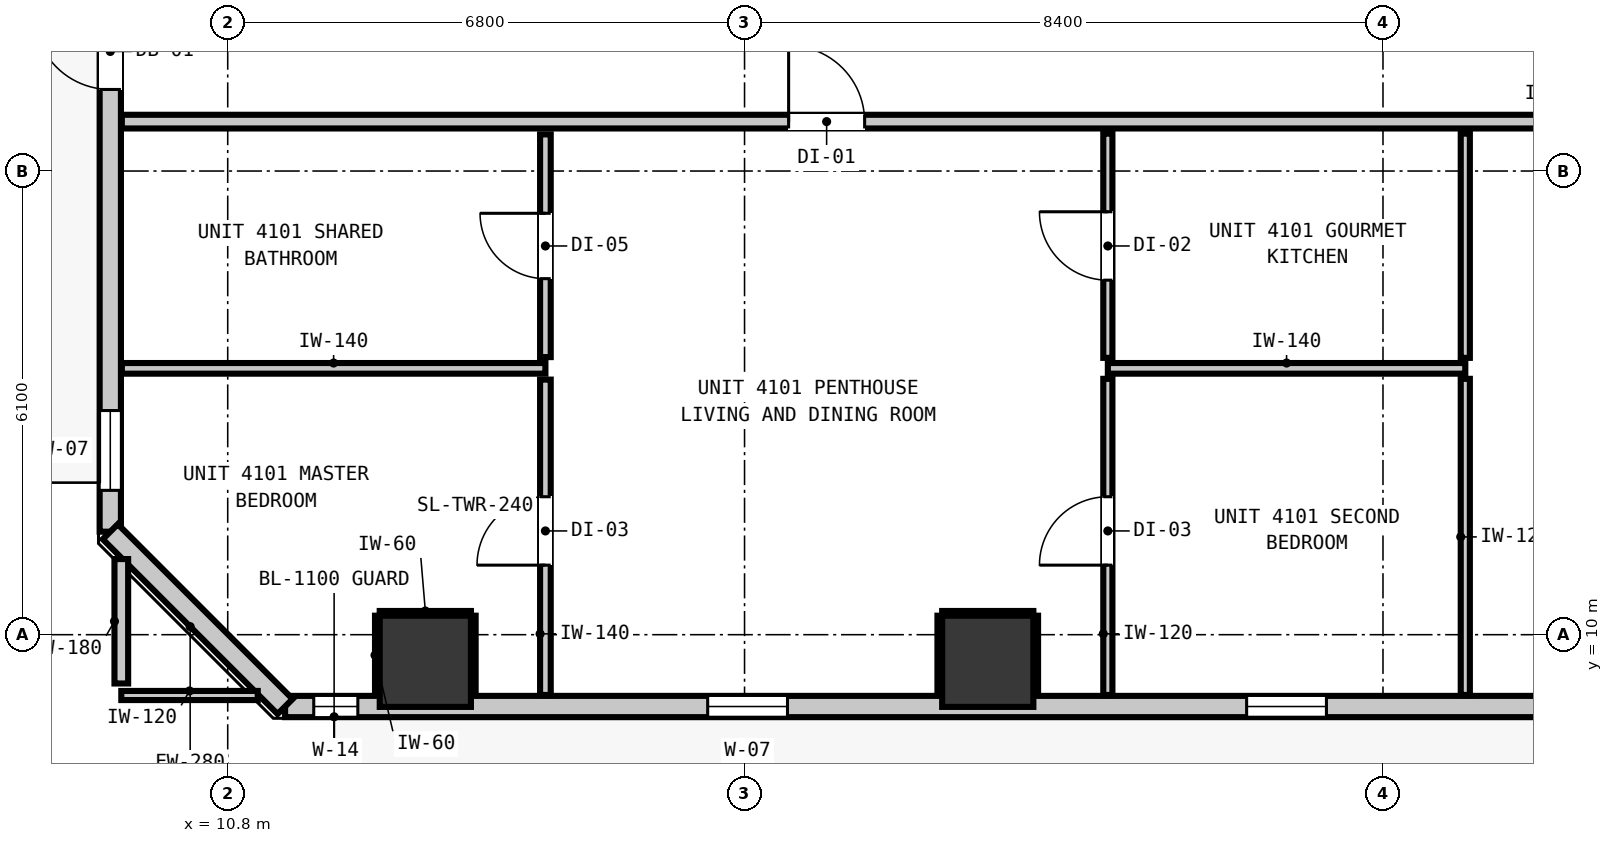
"""IFC4 building model, lengths in metres.
Left out: names, types, materials, properties, quantities, classifications, styles, units other than length and angle.
Written with IfcOpenShell. Run it as: python <this file> out.ifc"""

import sys

from ifc_helpers import new_model, si_unit, direction, frame, frame_2d, origin, origin_2d, place, context, subcontext, project, spatial, rectangle, extrude, element, fill, save


model = new_model("IFC4")
c1 = context("Model", 3, precision=1e-05, world=origin(), true_north=direction((0.0, 1.0)))
c2 = subcontext(c1, "Body", "Model", "MODEL_VIEW")
j1 = project(units=[si_unit("LENGTHUNIT", "METRE"), si_unit("PLANEANGLEUNIT", "RADIAN")], contexts=[c1])
p1 = place(None, origin())
s1 = spatial("IfcSite", under=j1, at=p1, CompositionType="ELEMENT")
p2 = place(p1, origin())
s2 = spatial("IfcBuilding", under=s1, at=p2, CompositionType="ELEMENT")
p3 = place(p2, frame((0.0, 0.0, 142.6)))
s3 = spatial("IfcBuildingStorey", under=s2, at=p3, CompositionType="ELEMENT", Elevation=142.6)
for number, where, z_axis, x_axis in (
    (1, (13.4, 9.65, 0.0), (0.0, 0.0, 1.0), (1.0, 0.0, 0.0)),
    (2, (20.8, 9.65, 0.0), (0.0, 0.0, 1.0), (1.0, 0.0, 0.0)),
):
    element("IfcColumn", number, at=place(p3, frame(where, z_axis=z_axis, x_axis=x_axis)), inside=s3, PredefinedType="COLUMN", context=c2, shape_type="SweptSolid", body=[
        extrude(rectangle(XDim=1.2, YDim=1.2, at=origin_2d()), origin(), (0.0, 0.0, 1.0), 2.9),
    ])
p4 = place(p3, frame((9.255, 11.355, 0.0), z_axis=(0.0, 0.0, 1.0), x_axis=(0.0, 1.0, 0.0)))
e3 = element("IfcWall", 3, at=p4, inside=s3, PredefinedType="STANDARD", context=c2, shape_type="SweptSolid", body=[
    extrude(rectangle(XDim=32.29, YDim=0.28, at=frame_2d((16.145, 0.0))), origin(), (0.0, 0.0, 1.0), 2.9),
])
p5 = place(p4, frame((5.818, 0.0, 0.0)))
e4 = element("IfcOpeningElement", 4, at=p5, cuts=e3, PredefinedType="OPENING", context=c2, shape_type="SweptSolid", body=[
    extrude(rectangle(XDim=1.0, YDim=2.15, at=frame_2d((0.5, 1.075))), frame((0.0, 0.15, 0.0), z_axis=(0.0, -1.0, 0.0), x_axis=(1.0, 0.0, 0.0)), (0.0, 0.0, 1.0), 0.3),
])
p6 = place(p4, frame((0.544, 0.0, 0.85)))
e5 = element("IfcOpeningElement", 5, at=p6, cuts=e3, PredefinedType="OPENING", context=c2, shape_type="SweptSolid", body=[
    extrude(rectangle(XDim=1.05, YDim=1.65, at=frame_2d((0.525, 0.825))), frame((0.0, 0.15, 0.0), z_axis=(0.0, -1.0, 0.0), x_axis=(1.0, 0.0, 0.0)), (0.0, 0.0, 1.0), 0.3),
])
p7 = place(p3, frame((46.645, 9.055, 0.0), z_axis=(0.0, 0.0, 1.0), x_axis=(-1.0, 0.0, 0.0)))
e6 = element("IfcWall", 6, at=p7, inside=s3, PredefinedType="STANDARD", context=c2, shape_type="SweptSolid", body=[
    extrude(rectangle(XDim=35.09, YDim=0.28, at=frame_2d((17.545, 0.0))), origin(), (0.0, 0.0, 1.0), 2.9),
])
p8 = place(p7, frame((0.904, 0.0, 0.0)))
e7 = element("IfcOpeningElement", 7, at=p8, cuts=e6, PredefinedType="OPENING", context=c2, shape_type="SweptSolid", body=[
    extrude(rectangle(XDim=1.0, YDim=2.15, at=frame_2d((0.5, 1.075))), frame((0.0, 0.15, 0.0), z_axis=(0.0, -1.0, 0.0), x_axis=(1.0, 0.0, 0.0)), (0.0, 0.0, 1.0), 0.3),
])
p9 = place(p7, frame((28.48, 0.0, 0.85)))
e8 = element("IfcOpeningElement", 8, at=p9, cuts=e6, PredefinedType="OPENING", context=c2, shape_type="SweptSolid", body=[
    extrude(rectangle(XDim=1.05, YDim=1.65, at=frame_2d((0.525, 0.825))), frame((0.0, 0.15, 0.0), z_axis=(0.0, -1.0, 0.0), x_axis=(1.0, 0.0, 0.0)), (0.0, 0.0, 1.0), 0.3),
])
p10 = place(p7, frame((34.133, 0.0, 0.85)))
e9 = element("IfcOpeningElement", 9, at=p10, cuts=e6, PredefinedType="OPENING", context=c2, shape_type="SweptSolid", body=[
    extrude(rectangle(XDim=0.58, YDim=1.5, at=frame_2d((0.29, 0.75))), frame((0.0, 0.15, 0.0), z_axis=(0.0, -1.0, 0.0), x_axis=(1.0, 0.0, 0.0)), (0.0, 0.0, 1.0), 0.3),
])
p11 = place(p7, frame((21.389, 0.0, 0.85)))
e10 = element("IfcOpeningElement", 10, at=p11, cuts=e6, PredefinedType="OPENING", context=c2, shape_type="SweptSolid", body=[
    extrude(rectangle(XDim=1.05, YDim=1.65, at=frame_2d((0.525, 0.825))), frame((0.0, 0.15, 0.0), z_axis=(0.0, -1.0, 0.0), x_axis=(1.0, 0.0, 0.0)), (0.0, 0.0, 1.0), 0.3),
])
p12 = place(p7, frame((5.299, 0.0, 0.85)))
e11 = element("IfcOpeningElement", 11, at=p12, cuts=e6, PredefinedType="OPENING", context=c2, shape_type="SweptSolid", body=[
    extrude(rectangle(XDim=1.05, YDim=1.65, at=frame_2d((0.525, 0.825))), frame((0.0, 0.15, 0.0), z_axis=(0.0, -1.0, 0.0), x_axis=(1.0, 0.0, 0.0)), (0.0, 0.0, 1.0), 0.3),
])
p13 = place(p3, frame((11.555, 9.055, 0.0), z_axis=(0.0, 0.0, 1.0), x_axis=(-0.707106781187, 0.707106781187, 0.0)))
e12 = element("IfcWall", 12, at=p13, inside=s3, PredefinedType="STANDARD", context=c2, shape_type="SweptSolid", body=[
    extrude(rectangle(XDim=3.253, YDim=0.28, at=frame_2d((1.626, 0.0))), origin(), (0.0, 0.0, 1.0), 2.9),
])
p14 = place(p3, frame((9.407, 16.75, 0.0), z_axis=(0.0, 0.0, 1.0), x_axis=(1.0, 0.0, 0.0)))
e13 = element("IfcWall", 13, at=p14, inside=s3, PredefinedType="PARTITIONING", context=c2, shape_type="SweptSolid", body=[
    extrude(rectangle(XDim=39.386, YDim=0.18, at=frame_2d((19.693, 0.0))), origin(), (0.0, 0.0, 1.0), 2.9),
])
p15 = place(p14, frame((8.773, 0.0, 0.0)))
e14 = element("IfcOpeningElement", 14, at=p15, cuts=e13, PredefinedType="OPENING", context=c2, shape_type="SweptSolid", body=[
    extrude(rectangle(XDim=1.0, YDim=2.15, at=frame_2d((0.5, 1.075))), frame((0.0, 0.1, 0.0), z_axis=(0.0, -1.0, 0.0), x_axis=(1.0, 0.0, 0.0)), (0.0, 0.0, 1.0), 0.2),
])
p16 = place(p14, frame((28.06, 0.0, 0.0)))
e15 = element("IfcOpeningElement", 15, at=p16, cuts=e13, PredefinedType="OPENING", context=c2, shape_type="SweptSolid", body=[
    extrude(rectangle(XDim=0.9, YDim=2.1, at=frame_2d((0.45, 1.05))), frame((0.0, 0.1, 0.0), z_axis=(0.0, -1.0, 0.0), x_axis=(1.0, 0.0, 0.0)), (0.0, 0.0, 1.0), 0.2),
])
p17 = place(p3, frame((9.407, 13.504, 0.0), z_axis=(0.0, 0.0, 1.0), x_axis=(1.0, 0.0, 0.0)))
e16 = element("IfcWall", 16, at=p17, inside=s3, PredefinedType="PARTITIONING", context=c2, shape_type="SweptSolid", body=[
    extrude(rectangle(XDim=5.573, YDim=0.14, at=frame_2d((2.787, 0.0))), origin(), (0.0, 0.0, 1.0), 2.9),
])
p18 = place(p3, frame((22.38, 13.504, 0.0), z_axis=(0.0, 0.0, 1.0), x_axis=(1.0, 0.0, 0.0)))
e17 = element("IfcWall", 17, at=p18, inside=s3, PredefinedType="PARTITIONING", context=c2, shape_type="SweptSolid", body=[
    extrude(rectangle(XDim=4.703, YDim=0.14, at=frame_2d((2.352, 0.0))), origin(), (0.0, 0.0, 1.0), 2.9),
])
p19 = place(p3, frame((9.4, 9.2, 0.0), z_axis=(0.0, 0.0, 1.0), x_axis=(1.0, 0.0, 0.0)))
e18 = element("IfcWall", 18, at=p19, inside=s3, PredefinedType="PARTITIONING", context=c2, shape_type="SweptSolid", body=[
    extrude(rectangle(XDim=1.795, YDim=0.12, at=frame_2d((0.897, 0.0))), origin(), (0.0, 0.0, 1.0), 2.9),
])
p20 = place(p3, frame((9.4, 9.358, 0.0), z_axis=(0.0, 0.0, 1.0), x_axis=(0.0, 1.0, 0.0)))
e19 = element("IfcWall", 19, at=p20, inside=s3, PredefinedType="PARTITIONING", context=c2, shape_type="SweptSolid", body=[
    extrude(rectangle(XDim=1.637, YDim=0.18, at=frame_2d((0.819, 0.0))), origin(), (0.0, 0.0, 1.0), 2.9),
])
p21 = place(p3, frame((14.98, 9.207, 0.0), z_axis=(0.0, 0.0, 1.0), x_axis=(0.0, 1.0, 0.0)))
e20 = element("IfcWall", 20, at=p21, inside=s3, PredefinedType="PARTITIONING", context=c2, shape_type="SweptSolid", body=[
    extrude(rectangle(XDim=4.149, YDim=0.14, at=frame_2d((2.074, 0.0))), origin(), (0.0, 0.0, 1.0), 2.9),
])
p22 = place(p21, frame((1.708, 0.0, 0.0)))
e21 = element("IfcOpeningElement", 21, at=p22, cuts=e20, PredefinedType="OPENING", context=c2, shape_type="SweptSolid", body=[
    extrude(rectangle(XDim=0.9, YDim=2.1, at=frame_2d((0.45, 1.05))), frame((0.0, 0.08, 0.0), z_axis=(0.0, -1.0, 0.0), x_axis=(1.0, 0.0, 0.0)), (0.0, 0.0, 1.0), 0.16),
])
p23 = place(p3, frame((14.98, 13.652, 0.0), z_axis=(0.0, 0.0, 1.0), x_axis=(0.0, 1.0, 0.0)))
e22 = element("IfcWall", 22, at=p23, inside=s3, PredefinedType="PARTITIONING", context=c2, shape_type="SweptSolid", body=[
    extrude(rectangle(XDim=2.93, YDim=0.14, at=frame_2d((1.465, 0.0))), origin(), (0.0, 0.0, 1.0), 2.9),
])
p24 = place(p23, frame((1.032, 0.0, 0.0)))
e23 = element("IfcOpeningElement", 23, at=p24, cuts=e22, PredefinedType="OPENING", context=c2, shape_type="SweptSolid", body=[
    extrude(rectangle(XDim=0.86, YDim=2.02, at=frame_2d((0.43, 1.01))), frame((0.0, 0.08, 0.0), z_axis=(0.0, -1.0, 0.0), x_axis=(1.0, 0.0, 0.0)), (0.0, 0.0, 1.0), 0.16),
])
p25 = place(p3, frame((22.38, 9.207, 0.0), z_axis=(0.0, 0.0, 1.0), x_axis=(0.0, 1.0, 0.0)))
e24 = element("IfcWall", 24, at=p25, inside=s3, PredefinedType="PARTITIONING", context=c2, shape_type="SweptSolid", body=[
    extrude(rectangle(XDim=4.159, YDim=0.12, at=frame_2d((2.08, 0.0))), origin(), (0.0, 0.0, 1.0), 2.9),
])
p26 = place(p25, frame((1.708, 0.0, 0.0)))
e25 = element("IfcOpeningElement", 25, at=p26, cuts=e24, PredefinedType="OPENING", context=c2, shape_type="SweptSolid", body=[
    extrude(rectangle(XDim=0.9, YDim=2.1, at=frame_2d((0.45, 1.05))), frame((0.0, 0.07, 0.0), z_axis=(0.0, -1.0, 0.0), x_axis=(1.0, 0.0, 0.0)), (0.0, 0.0, 1.0), 0.14),
])
p27 = place(p3, frame((22.38, 13.642, 0.0), z_axis=(0.0, 0.0, 1.0), x_axis=(0.0, 1.0, 0.0)))
e26 = element("IfcWall", 26, at=p27, inside=s3, PredefinedType="PARTITIONING", context=c2, shape_type="SweptSolid", body=[
    extrude(rectangle(XDim=2.95, YDim=0.12, at=frame_2d((1.475, 0.0))), origin(), (0.0, 0.0, 1.0), 2.9),
])
p28 = place(p27, frame((1.022, 0.0, 0.0)))
e27 = element("IfcOpeningElement", 27, at=p28, cuts=e26, PredefinedType="OPENING", context=c2, shape_type="SweptSolid", body=[
    extrude(rectangle(XDim=0.9, YDim=2.1, at=frame_2d((0.45, 1.05))), frame((0.0, 0.07, 0.0), z_axis=(0.0, -1.0, 0.0), x_axis=(1.0, 0.0, 0.0)), (0.0, 0.0, 1.0), 0.14),
])
p29 = place(p3, frame((27.083, 9.207, 0.0), z_axis=(0.0, 0.0, 1.0), x_axis=(0.0, 1.0, 0.0)))
e28 = element("IfcWall", 28, at=p29, inside=s3, PredefinedType="PARTITIONING", context=c2, shape_type="SweptSolid", body=[
    extrude(rectangle(XDim=4.159, YDim=0.12, at=frame_2d((2.08, 0.0))), origin(), (0.0, 0.0, 1.0), 2.9),
])
p30 = place(p3, frame((27.083, 13.642, 0.0), z_axis=(0.0, 0.0, 1.0), x_axis=(0.0, 1.0, 0.0)))
e29 = element("IfcWall", 29, at=p30, inside=s3, PredefinedType="PARTITIONING", context=c2, shape_type="SweptSolid", body=[
    extrude(rectangle(XDim=2.95, YDim=0.12, at=frame_2d((1.475, 0.0))), origin(), (0.0, 0.0, 1.0), 2.9),
])
p31 = place(p3, frame((12.8, 10.282, 0.0), z_axis=(0.0, 0.0, 1.0), x_axis=(1.0, 0.0, 0.0)))
e30 = element("IfcWall", 30, at=p31, inside=s3, PredefinedType="PARTITIONING", context=c2, shape_type="SweptSolid", body=[
    extrude(rectangle(XDim=1.2, YDim=0.06, at=frame_2d((0.6, 0.0))), origin(), (0.0, 0.0, 1.0), 1.45),
])
for number, where, z_axis, x_axis in (
    (31, (12.768, 9.21, 0.0), (0.0, 0.0, 1.0), (0.0, 1.0, 0.0)),
    (32, (14.032, 9.21, 0.0), (0.0, 0.0, 1.0), (0.0, 1.0, 0.0)),
):
    element("IfcWall", number, at=place(p3, frame(where, z_axis=z_axis, x_axis=x_axis)), inside=s3, PredefinedType="PARTITIONING", context=c2, shape_type="SweptSolid", body=[
        extrude(rectangle(XDim=1.04, YDim=0.06, at=frame_2d((0.52, 0.0))), origin(), (0.0, 0.0, 1.0), 0.905),
    ])
p32 = place(p3, frame((20.2, 10.282, 0.0), z_axis=(0.0, 0.0, 1.0), x_axis=(1.0, 0.0, 0.0)))
e33 = element("IfcWall", 33, at=p32, inside=s3, PredefinedType="PARTITIONING", context=c2, shape_type="SweptSolid", body=[
    extrude(rectangle(XDim=1.2, YDim=0.06, at=frame_2d((0.6, 0.0))), origin(), (0.0, 0.0, 1.0), 1.45),
])
for number, where, z_axis, x_axis in (
    (34, (20.168, 9.21, 0.0), (0.0, 0.0, 1.0), (0.0, 1.0, 0.0)),
    (35, (21.432, 9.21, 0.0), (0.0, 0.0, 1.0), (0.0, 1.0, 0.0)),
):
    element("IfcWall", number, at=place(p3, frame(where, z_axis=z_axis, x_axis=x_axis)), inside=s3, PredefinedType="PARTITIONING", context=c2, shape_type="SweptSolid", body=[
        extrude(rectangle(XDim=1.04, YDim=0.06, at=frame_2d((0.52, 0.0))), origin(), (0.0, 0.0, 1.0), 0.905),
    ])
p33 = place(p5, origin())
e36 = element("IfcDoor", 36, at=p33, inside=s3, OperationType="SINGLE_SWING_RIGHT", PredefinedType="DOOR", context=c2, shape_type="SweptSolid", body=[
    extrude(rectangle(XDim=1.0, YDim=2.15, at=frame_2d((0.5, 1.075))), frame((0.0, 0.025, 0.0), z_axis=(0.0, -1.0, 0.0), x_axis=(1.0, 0.0, 0.0)), (0.0, 0.0, 1.0), 0.05),
])
fill(e4, e36)
p34 = place(p6, origin())
e37 = element("IfcWindow", 37, at=p34, inside=s3, PartitioningType="SINGLE_PANEL", PredefinedType="WINDOW", context=c2, shape_type="SweptSolid", body=[
    extrude(rectangle(XDim=1.05, YDim=1.65, at=frame_2d((0.525, 0.825))), frame((0.0, 0.03, 0.0), z_axis=(0.0, -1.0, 0.0), x_axis=(1.0, 0.0, 0.0)), (0.0, 0.0, 1.0), 0.06),
])
fill(e5, e37)
p35 = place(p9, origin())
e38 = element("IfcWindow", 38, at=p35, inside=s3, PartitioningType="SINGLE_PANEL", PredefinedType="WINDOW", context=c2, shape_type="SweptSolid", body=[
    extrude(rectangle(XDim=1.05, YDim=1.65, at=frame_2d((0.525, 0.825))), frame((0.0, 0.03, 0.0), z_axis=(0.0, -1.0, 0.0), x_axis=(1.0, 0.0, 0.0)), (0.0, 0.0, 1.0), 0.06),
])
fill(e8, e38)
p36 = place(p10, origin())
e39 = element("IfcWindow", 39, at=p36, inside=s3, PartitioningType="SINGLE_PANEL", PredefinedType="WINDOW", context=c2, shape_type="SweptSolid", body=[
    extrude(rectangle(XDim=0.58, YDim=1.5, at=frame_2d((0.29, 0.75))), frame((0.0, 0.03, 0.0), z_axis=(0.0, -1.0, 0.0), x_axis=(1.0, 0.0, 0.0)), (0.0, 0.0, 1.0), 0.06),
])
fill(e9, e39)
p37 = place(p11, origin())
e40 = element("IfcWindow", 40, at=p37, inside=s3, PartitioningType="SINGLE_PANEL", PredefinedType="WINDOW", context=c2, shape_type="SweptSolid", body=[
    extrude(rectangle(XDim=1.05, YDim=1.65, at=frame_2d((0.525, 0.825))), frame((0.0, 0.03, 0.0), z_axis=(0.0, -1.0, 0.0), x_axis=(1.0, 0.0, 0.0)), (0.0, 0.0, 1.0), 0.06),
])
fill(e10, e40)
p38 = place(p15, origin())
e41 = element("IfcDoor", 41, at=p38, inside=s3, OperationType="SINGLE_SWING_LEFT", PredefinedType="DOOR", context=c2, shape_type="SweptSolid", body=[
    extrude(rectangle(XDim=1.0, YDim=2.15, at=frame_2d((0.5, 1.075))), frame((0.0, 0.025, 0.0), z_axis=(0.0, -1.0, 0.0), x_axis=(1.0, 0.0, 0.0)), (0.0, 0.0, 1.0), 0.05),
])
fill(e14, e41)
p39 = place(p24, origin())
e42 = element("IfcDoor", 42, at=p39, inside=s3, OperationType="SINGLE_SWING_RIGHT", PredefinedType="DOOR", context=c2, shape_type="SweptSolid", body=[
    extrude(rectangle(XDim=0.86, YDim=2.02, at=frame_2d((0.43, 1.01))), frame((0.0, 0.025, 0.0), z_axis=(0.0, -1.0, 0.0), x_axis=(1.0, 0.0, 0.0)), (0.0, 0.0, 1.0), 0.05),
])
fill(e23, e42)
p40 = place(p22, origin())
e43 = element("IfcDoor", 43, at=p40, inside=s3, OperationType="SINGLE_SWING_LEFT", PredefinedType="DOOR", context=c2, shape_type="SweptSolid", body=[
    extrude(rectangle(XDim=0.9, YDim=2.1, at=frame_2d((0.45, 1.05))), frame((0.0, 0.025, 0.0), z_axis=(0.0, -1.0, 0.0), x_axis=(1.0, 0.0, 0.0)), (0.0, 0.0, 1.0), 0.05),
])
fill(e21, e43)
p41 = place(p28, origin())
e44 = element("IfcDoor", 44, at=p41, inside=s3, OperationType="SINGLE_SWING_RIGHT", PredefinedType="DOOR", context=c2, shape_type="SweptSolid", body=[
    extrude(rectangle(XDim=0.9, YDim=2.1, at=frame_2d((0.45, 1.05))), frame((0.0, 0.025, 0.0), z_axis=(0.0, -1.0, 0.0), x_axis=(1.0, 0.0, 0.0)), (0.0, 0.0, 1.0), 0.05),
])
fill(e27, e44)
p42 = place(p26, origin())
e45 = element("IfcDoor", 45, at=p42, inside=s3, OperationType="SINGLE_SWING_LEFT", PredefinedType="DOOR", context=c2, shape_type="SweptSolid", body=[
    extrude(rectangle(XDim=0.9, YDim=2.1, at=frame_2d((0.45, 1.05))), frame((0.0, 0.025, 0.0), z_axis=(0.0, -1.0, 0.0), x_axis=(1.0, 0.0, 0.0)), (0.0, 0.0, 1.0), 0.05),
])
fill(e25, e45)
save(model, sys.argv[1])
